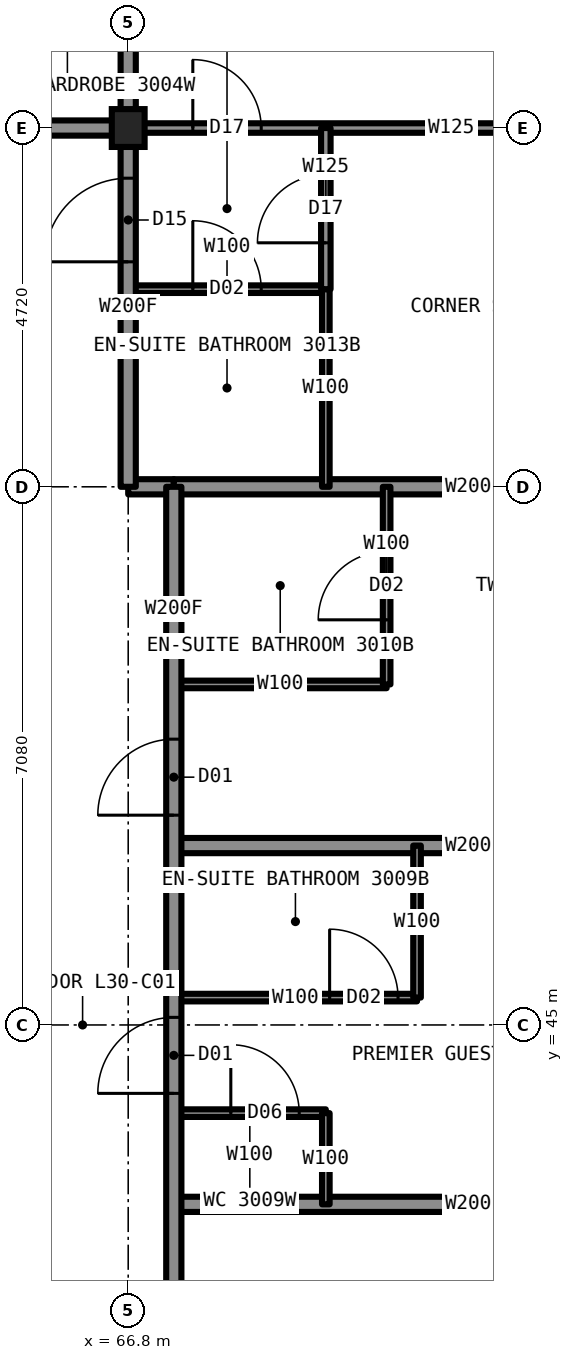
"""IFC4 building model, lengths in metres.
Left out: names, types, materials, properties, quantities, classifications, styles, units other than length and angle.
Written with IfcOpenShell. Run it as: python <this file> out.ifc"""

import sys

from ifc_helpers import new_model, si_unit, direction, frame, frame_2d, origin, origin_2d, place, context, subcontext, project, spatial, rectangle, i_section, extrude, element, fill, save


model = new_model("IFC4")
c1 = context("Model", 3, precision=1e-05, world=origin(), true_north=direction((0.0, 1.0)))
c2 = subcontext(c1, "Body", "Model", "MODEL_VIEW")
j1 = project(units=[si_unit("LENGTHUNIT", "METRE"), si_unit("PLANEANGLEUNIT", "RADIAN")], contexts=[c1])
p1 = place(None, origin())
s1 = spatial("IfcSite", under=j1, at=p1, CompositionType="ELEMENT")
p2 = place(p1, origin())
s2 = spatial("IfcBuilding", under=s1, at=p2, CompositionType="ELEMENT")
p3 = place(p2, frame((0.0, 0.0, 114.4)))
s3 = spatial("IfcBuildingStorey", under=s2, at=p3, CompositionType="ELEMENT", Elevation=114.4)
p4 = place(p3, frame((66.8, 56.8, 0.0), z_axis=(0.0, 0.0, 1.0), x_axis=(1.0, 0.0, 0.0)))
e1 = element("IfcColumn", 1, at=p4, inside=s3, PredefinedType="COLUMN", context=c2, shape_type="SweptSolid", body=[
    extrude(i_section(OverallWidth=0.432, OverallDepth=0.498, WebThickness=0.056, FlangeThickness=0.089, at=origin_2d()), origin(), (0.0, 0.0, 1.0), 3.5),
])
p5 = place(p3, frame((67.4, 43.84, 0.0), z_axis=(0.0, 0.0, 1.0), x_axis=(1.0, 0.0, 0.0)))
e2 = element("IfcWall", 2, at=p5, inside=s3, PredefinedType="PARTITIONING", context=c2, shape_type="SweptSolid", body=[
    extrude(rectangle(XDim=2.0, YDim=0.1, at=frame_2d((1.0, 0.0))), origin(), (0.0, 0.0, 1.0), 3.33),
])
p6 = place(p5, frame((0.75, 0.0, 0.0)))
e3 = element("IfcOpeningElement", 3, at=p6, cuts=e2, PredefinedType="OPENING", context=c2, shape_type="SweptSolid", body=[
    extrude(rectangle(XDim=0.9, YDim=2.1, at=frame_2d((0.45, 1.05))), frame((0.0, 0.06, 0.0), z_axis=(0.0, -1.0, 0.0), x_axis=(1.0, 0.0, 0.0)), (0.0, 0.0, 1.0), 0.12),
])
p7 = place(p3, frame((67.4, 42.64, 0.0), z_axis=(0.0, 0.0, 1.0), x_axis=(1.0, 0.0, 0.0)))
e4 = element("IfcWall", 4, at=p7, inside=s3, PredefinedType="PARTITIONING", context=c2, shape_type="SweptSolid", body=[
    extrude(rectangle(XDim=7.9, YDim=0.2, at=frame_2d((3.95, 0.0))), origin(), (0.0, 0.0, 1.0), 2.731),
])
p8 = place(p3, frame((67.4, 45.36, 0.0), z_axis=(0.0, 0.0, 1.0), x_axis=(1.0, 0.0, 0.0)))
e5 = element("IfcWall", 5, at=p8, inside=s3, PredefinedType="PARTITIONING", context=c2, shape_type="SweptSolid", body=[
    extrude(rectangle(XDim=3.2, YDim=0.1, at=frame_2d((1.6, 0.0))), origin(), (0.0, 0.0, 1.0), 3.33),
])
p9 = place(p8, frame((2.05, 0.0, 0.0)))
e6 = element("IfcOpeningElement", 6, at=p9, cuts=e5, PredefinedType="OPENING", context=c2, shape_type="SweptSolid", body=[
    extrude(rectangle(XDim=0.9, YDim=2.1, at=frame_2d((0.45, 1.05))), frame((0.0, 0.06, 0.0), z_axis=(0.0, -1.0, 0.0), x_axis=(1.0, 0.0, 0.0)), (0.0, 0.0, 1.0), 0.12),
])
p10 = place(p3, frame((43.2, 56.8, 0.0), z_axis=(0.0, 0.0, 1.0), x_axis=(1.0, 0.0, 0.0)))
e7 = element("IfcWall", 7, at=p10, inside=s3, PredefinedType="PARTITIONING", context=c2, shape_type="SweptSolid", body=[
    extrude(rectangle(XDim=23.6, YDim=0.2, at=frame_2d((11.8, 0.0))), origin(), (0.0, 0.0, 1.0), 3.33),
])
p11 = place(p10, frame((2.26, 0.0, 0.0)))
e8 = element("IfcOpeningElement", 8, at=p11, cuts=e7, PredefinedType="OPENING", context=c2, shape_type="SweptSolid", body=[
    extrude(rectangle(XDim=1.0, YDim=2.2, at=frame_2d((0.5, 1.1))), frame((0.0, 0.11, 0.0), z_axis=(0.0, -1.0, 0.0), x_axis=(1.0, 0.0, 0.0)), (0.0, 0.0, 1.0), 0.22),
])
p12 = place(p10, frame((6.18, 0.0, 0.0)))
e9 = element("IfcOpeningElement", 9, at=p12, cuts=e7, PredefinedType="OPENING", context=c2, shape_type="SweptSolid", body=[
    extrude(rectangle(XDim=1.0, YDim=2.2, at=frame_2d((0.5, 1.1))), frame((0.0, 0.11, 0.0), z_axis=(0.0, -1.0, 0.0), x_axis=(1.0, 0.0, 0.0)), (0.0, 0.0, 1.0), 0.22),
])
p13 = place(p10, frame((11.99, 0.0, 0.0)))
e10 = element("IfcOpeningElement", 10, at=p13, cuts=e7, PredefinedType="OPENING", context=c2, shape_type="SweptSolid", body=[
    extrude(rectangle(XDim=1.0, YDim=2.2, at=frame_2d((0.5, 1.1))), frame((0.0, 0.11, 0.0), z_axis=(0.0, -1.0, 0.0), x_axis=(1.0, 0.0, 0.0)), (0.0, 0.0, 1.0), 0.22),
])
p14 = place(p10, frame((17.16, 0.0, 0.0)))
e11 = element("IfcOpeningElement", 11, at=p14, cuts=e7, PredefinedType="OPENING", context=c2, shape_type="SweptSolid", body=[
    extrude(rectangle(XDim=1.0, YDim=2.2, at=frame_2d((0.5, 1.1))), frame((0.0, 0.11, 0.0), z_axis=(0.0, -1.0, 0.0), x_axis=(1.0, 0.0, 0.0)), (0.0, 0.0, 1.0), 0.22),
])
p15 = place(p3, frame((66.8, 56.8, 0.0), z_axis=(0.0, 0.0, 1.0), x_axis=(1.0, 0.0, 0.0)))
e12 = element("IfcWall", 12, at=p15, inside=s3, PredefinedType="PARTITIONING", context=c2, shape_type="SweptSolid", body=[
    extrude(rectangle(XDim=8.5, YDim=0.125, at=frame_2d((4.25, 0.0))), origin(), (0.0, 0.0, 1.0), 2.573),
])
p16 = place(p15, frame((0.85, 0.0, 0.0)))
e13 = element("IfcOpeningElement", 13, at=p16, cuts=e12, PredefinedType="OPENING", context=c2, shape_type="SweptSolid", body=[
    extrude(rectangle(XDim=0.9, YDim=2.2, at=frame_2d((0.45, 1.1))), frame((0.0, 0.073, 0.0), z_axis=(0.0, -1.0, 0.0), x_axis=(1.0, 0.0, 0.0)), (0.0, 0.0, 1.0), 0.145),
])
p17 = place(p3, frame((67.4, 47.36, 0.0), z_axis=(0.0, 0.0, 1.0), x_axis=(1.0, 0.0, 0.0)))
e14 = element("IfcWall", 14, at=p17, inside=s3, PredefinedType="PARTITIONING", context=c2, shape_type="SweptSolid", body=[
    extrude(rectangle(XDim=7.9, YDim=0.2, at=frame_2d((3.95, 0.0))), origin(), (0.0, 0.0, 1.0), 2.731),
])
p18 = place(p3, frame((67.4, 49.48, 0.0), z_axis=(0.0, 0.0, 1.0), x_axis=(1.0, 0.0, 0.0)))
e15 = element("IfcWall", 15, at=p18, inside=s3, PredefinedType="PARTITIONING", context=c2, shape_type="SweptSolid", body=[
    extrude(rectangle(XDim=2.8, YDim=0.1, at=frame_2d((1.4, 0.0))), origin(), (0.0, 0.0, 1.0), 3.33),
])
p19 = place(p3, frame((66.8, 52.08, 0.0), z_axis=(0.0, 0.0, 1.0), x_axis=(1.0, 0.0, 0.0)))
e16 = element("IfcWall", 16, at=p19, inside=s3, PredefinedType="PARTITIONING", context=c2, shape_type="SweptSolid", body=[
    extrude(rectangle(XDim=0.6, YDim=0.2, at=frame_2d((0.3, 0.0))), origin(), (0.0, 0.0, 1.0), 2.573),
])
p20 = place(p3, frame((67.4, 52.08, 0.0), z_axis=(0.0, 0.0, 1.0), x_axis=(1.0, 0.0, 0.0)))
e17 = element("IfcWall", 17, at=p20, inside=s3, PredefinedType="PARTITIONING", context=c2, shape_type="SweptSolid", body=[
    extrude(rectangle(XDim=7.9, YDim=0.2, at=frame_2d((3.95, 0.0))), origin(), (0.0, 0.0, 1.0), 2.573),
])
p21 = place(p3, frame((66.8, 54.68, 0.0), z_axis=(0.0, 0.0, 1.0), x_axis=(1.0, 0.0, 0.0)))
e18 = element("IfcWall", 18, at=p21, inside=s3, PredefinedType="PARTITIONING", context=c2, shape_type="SweptSolid", body=[
    extrude(rectangle(XDim=2.6, YDim=0.1, at=frame_2d((1.3, 0.0))), origin(), (0.0, 0.0, 1.0), 3.33),
])
p22 = place(p21, frame((0.85, 0.0, 0.0)))
e19 = element("IfcOpeningElement", 19, at=p22, cuts=e18, PredefinedType="OPENING", context=c2, shape_type="SweptSolid", body=[
    extrude(rectangle(XDim=0.9, YDim=2.1, at=frame_2d((0.45, 1.05))), frame((0.0, 0.06, 0.0), z_axis=(0.0, -1.0, 0.0), x_axis=(1.0, 0.0, 0.0)), (0.0, 0.0, 1.0), 0.12),
])
p23 = place(p3, frame((66.8, 52.08, 0.0), z_axis=(0.0, 0.0, 1.0), x_axis=(0.0, 1.0, 0.0)))
e20 = element("IfcWall", 20, at=p23, inside=s3, PredefinedType="PARTITIONING", context=c2, shape_type="SweptSolid", body=[
    extrude(rectangle(XDim=4.72, YDim=0.2, at=frame_2d((2.36, 0.0))), origin(), (0.0, 0.0, 1.0), 3.33),
])
p24 = place(p23, frame((2.96, 0.0, 0.0)))
e21 = element("IfcOpeningElement", 21, at=p24, cuts=e20, PredefinedType="OPENING", context=c2, shape_type="SweptSolid", body=[
    extrude(rectangle(XDim=1.1, YDim=2.2, at=frame_2d((0.55, 1.1))), frame((0.0, 0.11, 0.0), z_axis=(0.0, -1.0, 0.0), x_axis=(1.0, 0.0, 0.0)), (0.0, 0.0, 1.0), 0.22),
])
p25 = place(p3, frame((66.8, 56.8, 0.0), z_axis=(0.0, 0.0, 1.0), x_axis=(0.0, 1.0, 0.0)))
e22 = element("IfcWall", 22, at=p25, inside=s3, PredefinedType="PARTITIONING", context=c2, shape_type="SweptSolid", body=[
    extrude(rectangle(XDim=8.5, YDim=0.2, at=frame_2d((4.25, 0.0))), origin(), (0.0, 0.0, 1.0), 2.573),
])
p26 = place(p3, frame((67.4, 37.92, 0.0), z_axis=(0.0, 0.0, 1.0), x_axis=(0.0, 1.0, 0.0)))
e23 = element("IfcWall", 23, at=p26, inside=s3, PredefinedType="PARTITIONING", context=c2, shape_type="SweptSolid", body=[
    extrude(rectangle(XDim=14.16, YDim=0.2, at=frame_2d((7.08, 0.0))), origin(), (0.0, 0.0, 1.0), 3.33),
])
p27 = place(p26, frame((2.55, 0.0, 0.0)))
e24 = element("IfcOpeningElement", 24, at=p27, cuts=e23, PredefinedType="OPENING", context=c2, shape_type="SweptSolid", body=[
    extrude(rectangle(XDim=1.0, YDim=2.2, at=frame_2d((0.5, 1.1))), frame((0.0, 0.11, 0.0), z_axis=(0.0, -1.0, 0.0), x_axis=(1.0, 0.0, 0.0)), (0.0, 0.0, 1.0), 0.22),
])
p28 = place(p26, frame((6.18, 0.0, 0.0)))
e25 = element("IfcOpeningElement", 25, at=p28, cuts=e23, PredefinedType="OPENING", context=c2, shape_type="SweptSolid", body=[
    extrude(rectangle(XDim=1.0, YDim=2.2, at=frame_2d((0.5, 1.1))), frame((0.0, 0.11, 0.0), z_axis=(0.0, -1.0, 0.0), x_axis=(1.0, 0.0, 0.0)), (0.0, 0.0, 1.0), 0.22),
])
p29 = place(p26, frame((9.84, 0.0, 0.0)))
e26 = element("IfcOpeningElement", 26, at=p29, cuts=e23, PredefinedType="OPENING", context=c2, shape_type="SweptSolid", body=[
    extrude(rectangle(XDim=1.0, YDim=2.2, at=frame_2d((0.5, 1.1))), frame((0.0, 0.11, 0.0), z_axis=(0.0, -1.0, 0.0), x_axis=(1.0, 0.0, 0.0)), (0.0, 0.0, 1.0), 0.22),
])
p30 = place(p3, frame((69.4, 42.64, 0.0), z_axis=(0.0, 0.0, 1.0), x_axis=(0.0, 1.0, 0.0)))
e27 = element("IfcWall", 27, at=p30, inside=s3, PredefinedType="PARTITIONING", context=c2, shape_type="SweptSolid", body=[
    extrude(rectangle(XDim=1.2, YDim=0.1, at=frame_2d((0.6, 0.0))), origin(), (0.0, 0.0, 1.0), 3.33),
])
p31 = place(p3, frame((69.4, 52.08, 0.0), z_axis=(0.0, 0.0, 1.0), x_axis=(0.0, 1.0, 0.0)))
e28 = element("IfcWall", 28, at=p31, inside=s3, PredefinedType="PARTITIONING", context=c2, shape_type="SweptSolid", body=[
    extrude(rectangle(XDim=2.6, YDim=0.1, at=frame_2d((1.3, 0.0))), origin(), (0.0, 0.0, 1.0), 3.33),
])
p32 = place(p3, frame((69.4, 54.68, 0.0), z_axis=(0.0, 0.0, 1.0), x_axis=(0.0, 1.0, 0.0)))
e29 = element("IfcWall", 29, at=p32, inside=s3, PredefinedType="PARTITIONING", context=c2, shape_type="SweptSolid", body=[
    extrude(rectangle(XDim=2.12, YDim=0.125, at=frame_2d((1.06, 0.0))), origin(), (0.0, 0.0, 1.0), 3.33),
])
p33 = place(p32, frame((0.61, 0.0, 0.0)))
e30 = element("IfcOpeningElement", 30, at=p33, cuts=e29, PredefinedType="OPENING", context=c2, shape_type="SweptSolid", body=[
    extrude(rectangle(XDim=0.9, YDim=2.2, at=frame_2d((0.45, 1.1))), frame((0.0, 0.073, 0.0), z_axis=(0.0, -1.0, 0.0), x_axis=(1.0, 0.0, 0.0)), (0.0, 0.0, 1.0), 0.145),
])
p34 = place(p3, frame((70.2, 49.48, 0.0), z_axis=(0.0, 0.0, 1.0), x_axis=(0.0, 1.0, 0.0)))
e31 = element("IfcWall", 31, at=p34, inside=s3, PredefinedType="PARTITIONING", context=c2, shape_type="SweptSolid", body=[
    extrude(rectangle(XDim=2.6, YDim=0.1, at=frame_2d((1.3, 0.0))), origin(), (0.0, 0.0, 1.0), 3.33),
])
p35 = place(p34, frame((0.85, 0.0, 0.0)))
e32 = element("IfcOpeningElement", 32, at=p35, cuts=e31, PredefinedType="OPENING", context=c2, shape_type="SweptSolid", body=[
    extrude(rectangle(XDim=0.9, YDim=2.1, at=frame_2d((0.45, 1.05))), frame((0.0, 0.06, 0.0), z_axis=(0.0, -1.0, 0.0), x_axis=(1.0, 0.0, 0.0)), (0.0, 0.0, 1.0), 0.12),
])
p36 = place(p3, frame((70.6, 45.36, 0.0), z_axis=(0.0, 0.0, 1.0), x_axis=(0.0, 1.0, 0.0)))
e33 = element("IfcWall", 33, at=p36, inside=s3, PredefinedType="PARTITIONING", context=c2, shape_type="SweptSolid", body=[
    extrude(rectangle(XDim=2.0, YDim=0.1, at=frame_2d((1.0, 0.0))), origin(), (0.0, 0.0, 1.0), 3.33),
])
p37 = place(p28, origin())
e34 = element("IfcDoor", 34, at=p37, inside=s3, OperationType="SINGLE_SWING_LEFT", PredefinedType="DOOR", context=c2, shape_type="SweptSolid", body=[
    extrude(rectangle(XDim=1.0, YDim=2.2, at=frame_2d((0.5, 1.1))), frame((0.0, 0.025, 0.0), z_axis=(0.0, -1.0, 0.0), x_axis=(1.0, 0.0, 0.0)), (0.0, 0.0, 1.0), 0.05),
])
fill(e25, e34)
p38 = place(p9, origin())
e35 = element("IfcDoor", 35, at=p38, inside=s3, OperationType="SINGLE_SWING_RIGHT", PredefinedType="DOOR", context=c2, shape_type="SweptSolid", body=[
    extrude(rectangle(XDim=0.9, YDim=2.1, at=frame_2d((0.45, 1.05))), frame((0.0, 0.025, 0.0), z_axis=(0.0, -1.0, 0.0), x_axis=(1.0, 0.0, 0.0)), (0.0, 0.0, 1.0), 0.05),
])
fill(e6, e35)
p39 = place(p6, origin())
e36 = element("IfcDoor", 36, at=p39, inside=s3, OperationType="SINGLE_SWING_LEFT", PredefinedType="DOOR", context=c2, shape_type="SweptSolid", body=[
    extrude(rectangle(XDim=0.9, YDim=2.1, at=frame_2d((0.45, 1.05))), frame((0.0, 0.025, 0.0), z_axis=(0.0, -1.0, 0.0), x_axis=(1.0, 0.0, 0.0)), (0.0, 0.0, 1.0), 0.05),
])
fill(e3, e36)
p40 = place(p29, origin())
e37 = element("IfcDoor", 37, at=p40, inside=s3, OperationType="SINGLE_SWING_LEFT", PredefinedType="DOOR", context=c2, shape_type="SweptSolid", body=[
    extrude(rectangle(XDim=1.0, YDim=2.2, at=frame_2d((0.5, 1.1))), frame((0.0, 0.025, 0.0), z_axis=(0.0, -1.0, 0.0), x_axis=(1.0, 0.0, 0.0)), (0.0, 0.0, 1.0), 0.05),
])
fill(e26, e37)
p41 = place(p35, origin())
e38 = element("IfcDoor", 38, at=p41, inside=s3, OperationType="SINGLE_SWING_RIGHT", PredefinedType="DOOR", context=c2, shape_type="SweptSolid", body=[
    extrude(rectangle(XDim=0.9, YDim=2.1, at=frame_2d((0.45, 1.05))), frame((0.0, 0.025, 0.0), z_axis=(0.0, -1.0, 0.0), x_axis=(1.0, 0.0, 0.0)), (0.0, 0.0, 1.0), 0.05),
])
fill(e32, e38)
p42 = place(p16, origin())
e39 = element("IfcDoor", 39, at=p42, inside=s3, OperationType="SINGLE_SWING_LEFT", PredefinedType="DOOR", context=c2, shape_type="SweptSolid", body=[
    extrude(rectangle(XDim=0.9, YDim=2.2, at=frame_2d((0.45, 1.1))), frame((0.0, 0.025, 0.0), z_axis=(0.0, -1.0, 0.0), x_axis=(1.0, 0.0, 0.0)), (0.0, 0.0, 1.0), 0.05),
])
fill(e13, e39)
p43 = place(p22, origin())
e40 = element("IfcDoor", 40, at=p43, inside=s3, OperationType="SINGLE_SWING_RIGHT", PredefinedType="DOOR", context=c2, shape_type="SweptSolid", body=[
    extrude(rectangle(XDim=0.9, YDim=2.1, at=frame_2d((0.45, 1.05))), frame((0.0, 0.025, 0.0), z_axis=(0.0, -1.0, 0.0), x_axis=(1.0, 0.0, 0.0)), (0.0, 0.0, 1.0), 0.05),
])
fill(e19, e40)
p44 = place(p24, origin())
e41 = element("IfcDoor", 41, at=p44, inside=s3, OperationType="SINGLE_SWING_LEFT", PredefinedType="DOOR", context=c2, shape_type="SweptSolid", body=[
    extrude(rectangle(XDim=1.1, YDim=2.2, at=frame_2d((0.55, 1.1))), frame((0.0, 0.025, 0.0), z_axis=(0.0, -1.0, 0.0), x_axis=(1.0, 0.0, 0.0)), (0.0, 0.0, 1.0), 0.05),
])
fill(e21, e41)
p45 = place(p33, origin())
e42 = element("IfcDoor", 42, at=p45, inside=s3, OperationType="SINGLE_SWING_LEFT", PredefinedType="DOOR", context=c2, shape_type="SweptSolid", body=[
    extrude(rectangle(XDim=0.9, YDim=2.2, at=frame_2d((0.45, 1.1))), frame((0.0, 0.025, 0.0), z_axis=(0.0, -1.0, 0.0), x_axis=(1.0, 0.0, 0.0)), (0.0, 0.0, 1.0), 0.05),
])
fill(e30, e42)
save(model, sys.argv[1])
